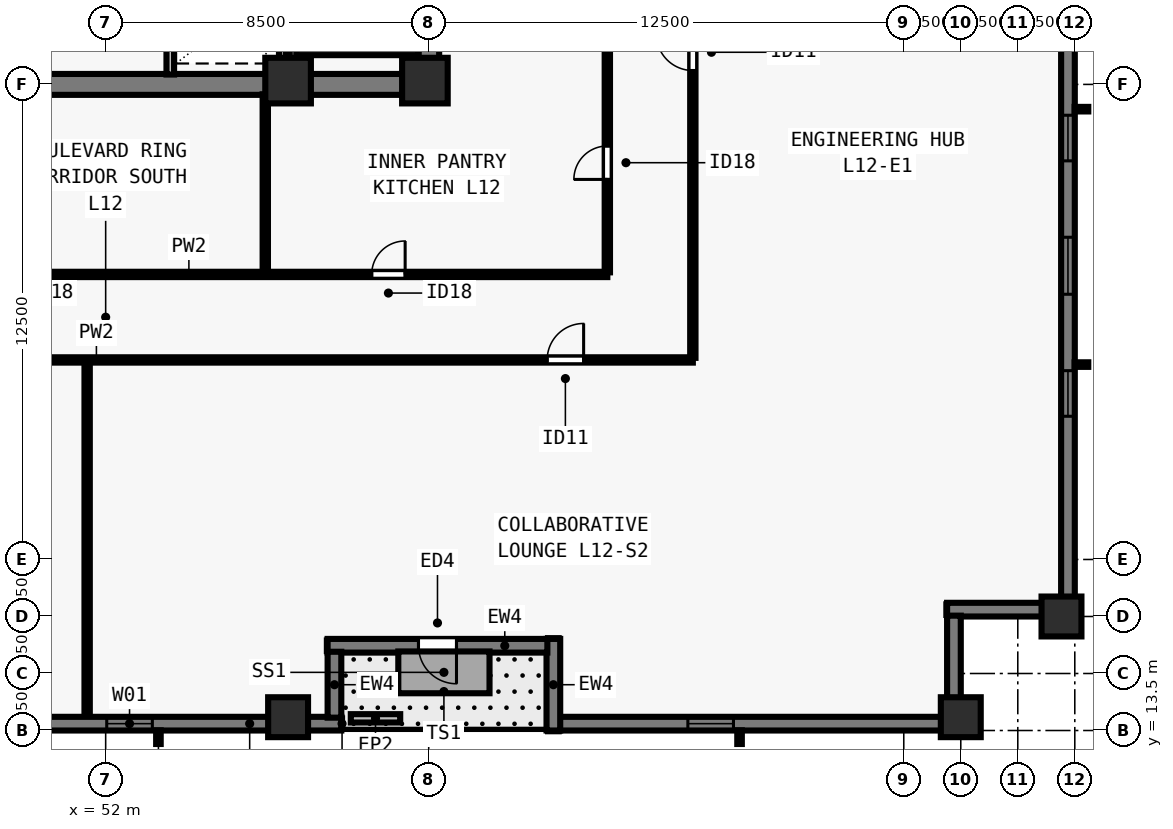
"""IFC4 building model, lengths in metres.
Left out: names, types, materials, properties, quantities, classifications, styles, units other than length and angle.
Written with IfcOpenShell. Run it as: python <this file> out.ifc"""

import sys

from ifc_helpers import new_model, si_unit, direction, frame, frame_2d, origin, origin_2d, place, context, subcontext, project, spatial, rectangle, extrude, element, fill, save


model = new_model("IFC4")
c1 = context("Model", 3, precision=1e-05, world=origin(), true_north=direction((0.0, 1.0)))
c2 = subcontext(c1, "Body", "Model", "MODEL_VIEW")
j1 = project(units=[si_unit("LENGTHUNIT", "METRE"), si_unit("PLANEANGLEUNIT", "RADIAN")], contexts=[c1])
p1 = place(None, origin())
s1 = spatial("IfcSite", under=j1, at=p1, CompositionType="ELEMENT")
p2 = place(p1, origin())
s2 = spatial("IfcBuilding", under=s1, at=p2, CompositionType="ELEMENT")
p3 = place(p2, frame((0.0, 0.0, 48.0)))
s3 = spatial("IfcBuildingStorey", under=s2, at=p3, CompositionType="ELEMENT", Elevation=48.0)
for number, where, z_axis, x_axis in (
    (1, (56.8, 30.6, 0.0), (0.0, 0.0, 1.0), (1.0, 0.0, 0.0)),
    (2, (60.4, 30.6, 0.0), (0.0, 0.0, 1.0), (1.0, 0.0, 0.0)),
):
    element("IfcColumn", number, at=place(p3, frame(where, z_axis=z_axis, x_axis=x_axis)), inside=s3, PredefinedType="COLUMN", context=c2, shape_type="SweptSolid", body=[
        extrude(rectangle(XDim=1.2, YDim=1.2, at=origin_2d()), origin(), (0.0, 0.0, 1.0), 3.5),
    ])
for number, where, z_axis, x_axis in (
    (3, (56.8, 13.85, 0.0), (0.0, 0.0, 1.0), (1.0, 0.0, 0.0)),
    (4, (74.5, 13.85, 0.0), (0.0, 0.0, 1.0), (1.0, 0.0, 0.0)),
    (5, (77.15, 16.5, 0.0), (0.0, 0.0, 1.0), (0.0, 1.0, 0.0)),
):
    element("IfcColumn", number, at=place(p3, frame(where, z_axis=z_axis, x_axis=x_axis)), inside=s3, PredefinedType="COLUMN", context=c2, shape_type="SweptSolid", body=[
        extrude(rectangle(XDim=1.05, YDim=1.05, at=origin_2d()), origin(), (0.0, 0.0, 1.0), 3.5),
    ])
p4 = place(p3, frame((58.2, 13.68, 0.0), z_axis=(0.0, 0.0, 1.0), x_axis=(-1.0, 0.0, 0.0)))
e6 = element("IfcWall", 6, at=p4, inside=s3, PredefinedType="SOLIDWALL", context=c2, shape_type="SweptSolid", body=[
    extrude(rectangle(XDim=28.362, YDim=0.36, at=frame_2d((14.181, 0.0))), origin(), (0.0, 0.0, 1.0), 3.28),
])
p5 = place(p4, frame((4.972, 0.0, 0.8)))
e7 = element("IfcOpeningElement", 7, at=p5, cuts=e6, PredefinedType="OPENING", context=c2, shape_type="SweptSolid", body=[
    extrude(rectangle(XDim=1.2, YDim=1.544, at=frame_2d((0.6, 0.772))), frame((0.0, 0.19, 0.0), z_axis=(0.0, -1.0, 0.0), x_axis=(1.0, 0.0, 0.0)), (0.0, 0.0, 1.0), 0.38),
])
p6 = place(p4, frame((8.265, 0.0, 0.8)))
e8 = element("IfcOpeningElement", 8, at=p6, cuts=e6, PredefinedType="OPENING", context=c2, shape_type="SweptSolid", body=[
    extrude(rectangle(XDim=1.5, YDim=1.544, at=frame_2d((0.75, 0.772))), frame((0.0, 0.19, 0.0), z_axis=(0.0, -1.0, 0.0), x_axis=(1.0, 0.0, 0.0)), (0.0, 0.0, 1.0), 0.38),
])
p7 = place(p4, frame((11.859, 0.0, 0.8)))
e9 = element("IfcOpeningElement", 9, at=p7, cuts=e6, PredefinedType="OPENING", context=c2, shape_type="SweptSolid", body=[
    extrude(rectangle(XDim=1.2, YDim=1.544, at=frame_2d((0.6, 0.772))), frame((0.0, 0.19, 0.0), z_axis=(0.0, -1.0, 0.0), x_axis=(1.0, 0.0, 0.0)), (0.0, 0.0, 1.0), 0.38),
])
p8 = place(p4, frame((15.153, 0.0, 0.8)))
e10 = element("IfcOpeningElement", 10, at=p8, cuts=e6, PredefinedType="OPENING", context=c2, shape_type="SweptSolid", body=[
    extrude(rectangle(XDim=1.5, YDim=1.544, at=frame_2d((0.75, 0.772))), frame((0.0, 0.19, 0.0), z_axis=(0.0, -1.0, 0.0), x_axis=(1.0, 0.0, 0.0)), (0.0, 0.0, 1.0), 0.38),
])
p9 = place(p4, frame((18.747, 0.0, 0.8)))
e11 = element("IfcOpeningElement", 11, at=p9, cuts=e6, PredefinedType="OPENING", context=c2, shape_type="SweptSolid", body=[
    extrude(rectangle(XDim=1.2, YDim=1.544, at=frame_2d((0.6, 0.772))), frame((0.0, 0.19, 0.0), z_axis=(0.0, -1.0, 0.0), x_axis=(1.0, 0.0, 0.0)), (0.0, 0.0, 1.0), 0.38),
])
p10 = place(p4, frame((22.04, 0.0, 0.8)))
e12 = element("IfcOpeningElement", 12, at=p10, cuts=e6, PredefinedType="OPENING", context=c2, shape_type="SweptSolid", body=[
    extrude(rectangle(XDim=1.5, YDim=1.544, at=frame_2d((0.75, 0.772))), frame((0.0, 0.19, 0.0), z_axis=(0.0, -1.0, 0.0), x_axis=(1.0, 0.0, 0.0)), (0.0, 0.0, 1.0), 0.38),
])
p11 = place(p3, frame((77.32, 61.5, 0.0), z_axis=(0.0, 0.0, 1.0), x_axis=(0.0, -1.0, 0.0)))
e13 = element("IfcWall", 13, at=p11, inside=s3, PredefinedType="SOLIDWALL", context=c2, shape_type="SweptSolid", body=[
    extrude(rectangle(XDim=44.662, YDim=0.36, at=frame_2d((22.331, 0.0))), origin(), (0.0, 0.0, 1.0), 3.28),
])
p12 = place(p11, frame((4.93, 0.0, 0.8)))
e14 = element("IfcOpeningElement", 14, at=p12, cuts=e13, PredefinedType="OPENING", context=c2, shape_type="SweptSolid", body=[
    extrude(rectangle(XDim=1.2, YDim=1.544, at=frame_2d((0.6, 0.772))), frame((0.0, 0.19, 0.0), z_axis=(0.0, -1.0, 0.0), x_axis=(1.0, 0.0, 0.0)), (0.0, 0.0, 1.0), 0.38),
])
p13 = place(p11, frame((8.14, 0.0, 0.8)))
e15 = element("IfcOpeningElement", 15, at=p13, cuts=e13, PredefinedType="OPENING", context=c2, shape_type="SweptSolid", body=[
    extrude(rectangle(XDim=1.5, YDim=1.544, at=frame_2d((0.75, 0.772))), frame((0.0, 0.19, 0.0), z_axis=(0.0, -1.0, 0.0), x_axis=(1.0, 0.0, 0.0)), (0.0, 0.0, 1.0), 0.38),
])
p14 = place(p11, frame((11.65, 0.0, 0.8)))
e16 = element("IfcOpeningElement", 16, at=p14, cuts=e13, PredefinedType="OPENING", context=c2, shape_type="SweptSolid", body=[
    extrude(rectangle(XDim=1.2, YDim=1.544, at=frame_2d((0.6, 0.772))), frame((0.0, 0.19, 0.0), z_axis=(0.0, -1.0, 0.0), x_axis=(1.0, 0.0, 0.0)), (0.0, 0.0, 1.0), 0.38),
])
p15 = place(p11, frame((14.861, 0.0, 0.8)))
e17 = element("IfcOpeningElement", 17, at=p15, cuts=e13, PredefinedType="OPENING", context=c2, shape_type="SweptSolid", body=[
    extrude(rectangle(XDim=1.5, YDim=1.544, at=frame_2d((0.75, 0.772))), frame((0.0, 0.19, 0.0), z_axis=(0.0, -1.0, 0.0), x_axis=(1.0, 0.0, 0.0)), (0.0, 0.0, 1.0), 0.38),
])
p16 = place(p11, frame((18.821, 0.0, 0.8)))
e18 = element("IfcOpeningElement", 18, at=p16, cuts=e13, PredefinedType="OPENING", context=c2, shape_type="SweptSolid", body=[
    extrude(rectangle(XDim=1.2, YDim=1.544, at=frame_2d((0.6, 0.772))), frame((0.0, 0.19, 0.0), z_axis=(0.0, -1.0, 0.0), x_axis=(1.0, 0.0, 0.0)), (0.0, 0.0, 1.0), 0.38),
])
p17 = place(p11, frame((20.331, 0.0, 0.8)))
e19 = element("IfcOpeningElement", 19, at=p17, cuts=e13, PredefinedType="OPENING", context=c2, shape_type="SweptSolid", body=[
    extrude(rectangle(XDim=1.5, YDim=1.544, at=frame_2d((0.75, 0.772))), frame((0.0, 0.19, 0.0), z_axis=(0.0, -1.0, 0.0), x_axis=(1.0, 0.0, 0.0)), (0.0, 0.0, 1.0), 0.38),
])
p18 = place(p11, frame((25.091, 0.0, 0.8)))
e20 = element("IfcOpeningElement", 20, at=p18, cuts=e13, PredefinedType="OPENING", context=c2, shape_type="SweptSolid", body=[
    extrude(rectangle(XDim=1.2, YDim=1.544, at=frame_2d((0.6, 0.772))), frame((0.0, 0.19, 0.0), z_axis=(0.0, -1.0, 0.0), x_axis=(1.0, 0.0, 0.0)), (0.0, 0.0, 1.0), 0.38),
])
p19 = place(p11, frame((28.302, 0.0, 0.8)))
e21 = element("IfcOpeningElement", 21, at=p19, cuts=e13, PredefinedType="OPENING", context=c2, shape_type="SweptSolid", body=[
    extrude(rectangle(XDim=1.5, YDim=1.544, at=frame_2d((0.75, 0.772))), frame((0.0, 0.19, 0.0), z_axis=(0.0, -1.0, 0.0), x_axis=(1.0, 0.0, 0.0)), (0.0, 0.0, 1.0), 0.38),
])
p20 = place(p11, frame((31.812, 0.0, 0.8)))
e22 = element("IfcOpeningElement", 22, at=p20, cuts=e13, PredefinedType="OPENING", context=c2, shape_type="SweptSolid", body=[
    extrude(rectangle(XDim=1.2, YDim=1.544, at=frame_2d((0.6, 0.772))), frame((0.0, 0.19, 0.0), z_axis=(0.0, -1.0, 0.0), x_axis=(1.0, 0.0, 0.0)), (0.0, 0.0, 1.0), 0.38),
])
p21 = place(p11, frame((35.022, 0.0, 0.8)))
e23 = element("IfcOpeningElement", 23, at=p21, cuts=e13, PredefinedType="OPENING", context=c2, shape_type="SweptSolid", body=[
    extrude(rectangle(XDim=1.5, YDim=1.544, at=frame_2d((0.75, 0.772))), frame((0.0, 0.19, 0.0), z_axis=(0.0, -1.0, 0.0), x_axis=(1.0, 0.0, 0.0)), (0.0, 0.0, 1.0), 0.38),
])
p22 = place(p11, frame((38.532, 0.0, 0.8)))
e24 = element("IfcOpeningElement", 24, at=p22, cuts=e13, PredefinedType="OPENING", context=c2, shape_type="SweptSolid", body=[
    extrude(rectangle(XDim=1.2, YDim=1.544, at=frame_2d((0.6, 0.772))), frame((0.0, 0.19, 0.0), z_axis=(0.0, -1.0, 0.0), x_axis=(1.0, 0.0, 0.0)), (0.0, 0.0, 1.0), 0.38),
])
p23 = place(p3, frame((77.5, 16.68, 0.0), z_axis=(0.0, 0.0, 1.0), x_axis=(-1.0, 0.0, 0.0)))
e25 = element("IfcWall", 25, at=p23, inside=s3, PredefinedType="SOLIDWALL", context=c2, shape_type="SweptSolid", body=[
    extrude(rectangle(XDim=3.36, YDim=0.36, at=frame_2d((1.68, 0.0))), origin(), (0.0, 0.0, 1.0), 3.28),
])
p24 = place(p3, frame((74.32, 16.522, 0.0), z_axis=(0.0, 0.0, 1.0), x_axis=(0.0, -1.0, 0.0)))
e26 = element("IfcWall", 26, at=p24, inside=s3, PredefinedType="SOLIDWALL", context=c2, shape_type="SweptSolid", body=[
    extrude(rectangle(XDim=2.684, YDim=0.36, at=frame_2d((1.342, 0.0))), origin(), (0.0, 0.0, 1.0), 3.28),
])
p25 = place(p3, frame((74.5, 13.68, 0.0), z_axis=(0.0, 0.0, 1.0), x_axis=(-1.0, 0.0, 0.0)))
e27 = element("IfcWall", 27, at=p25, inside=s3, PredefinedType="SOLIDWALL", context=c2, shape_type="SweptSolid", body=[
    extrude(rectangle(XDim=10.562, YDim=0.36, at=frame_2d((5.281, 0.0))), origin(), (0.0, 0.0, 1.0), 3.28),
])
p26 = place(p25, frame((5.981, 0.0, 0.8)))
e28 = element("IfcOpeningElement", 28, at=p26, cuts=e27, PredefinedType="OPENING", context=c2, shape_type="SweptSolid", body=[
    extrude(rectangle(XDim=1.2, YDim=1.544, at=frame_2d((0.6, 0.772))), frame((0.0, 0.19, 0.0), z_axis=(0.0, -1.0, 0.0), x_axis=(1.0, 0.0, 0.0)), (0.0, 0.0, 1.0), 0.38),
])
p27 = place(p3, frame((63.78, 13.5, 0.0), z_axis=(0.0, 0.0, 1.0), x_axis=(0.0, 1.0, 0.0)))
e29 = element("IfcWall", 29, at=p27, inside=s3, PredefinedType="SOLIDWALL", context=c2, shape_type="SweptSolid", body=[
    extrude(rectangle(XDim=2.41, YDim=0.36, at=frame_2d((1.205, 0.0))), origin(), (0.0, 0.0, 1.0), 3.28),
])
p28 = place(p3, frame((63.622, 15.73, 0.0), z_axis=(0.0, 0.0, 1.0), x_axis=(-1.0, 0.0, 0.0)))
e30 = element("IfcWall", 30, at=p28, inside=s3, PredefinedType="SOLIDWALL", context=c2, shape_type="SweptSolid", body=[
    extrude(rectangle(XDim=5.782, YDim=0.36, at=frame_2d((2.891, 0.0))), origin(), (0.0, 0.0, 1.0), 3.28),
])
p29 = place(p28, frame((2.391, 0.0, 0.0)))
e31 = element("IfcOpeningElement", 31, at=p29, cuts=e30, PredefinedType="OPENING", context=c2, shape_type="SweptSolid", body=[
    extrude(rectangle(XDim=1.0, YDim=2.15, at=frame_2d((0.5, 1.075))), frame((0.0, 0.19, 0.0), z_axis=(0.0, -1.0, 0.0), x_axis=(1.0, 0.0, 0.0)), (0.0, 0.0, 1.0), 0.38),
])
p30 = place(p3, frame((58.02, 15.572, 0.0), z_axis=(0.0, 0.0, 1.0), x_axis=(0.0, -1.0, 0.0)))
e32 = element("IfcWall", 32, at=p30, inside=s3, PredefinedType="SOLIDWALL", context=c2, shape_type="SweptSolid", body=[
    extrude(rectangle(XDim=1.734, YDim=0.36, at=frame_2d((0.867, 0.0))), origin(), (0.0, 0.0, 1.0), 3.28),
])
p31 = place(p3, frame((58.45, 13.82, 0.0), z_axis=(0.0, 0.0, 1.0), x_axis=(1.0, 0.0, 0.0)))
e33 = element("IfcWall", 33, at=p31, inside=s3, PredefinedType="PARAPET", context=c2, shape_type="SweptSolid", body=[
    extrude(rectangle(XDim=1.3, YDim=0.22, at=frame_2d((0.65, 0.0))), origin(), (0.0, 0.0, 1.0), 0.55),
])
p32 = place(p3, frame((43.225, 30.5, 0.0), z_axis=(0.0, 0.0, 1.0), x_axis=(1.0, 0.0, 0.0)))
e34 = element("IfcWall", 34, at=p32, inside=s3, PredefinedType="SHEAR", context=c2, shape_type="SweptSolid", body=[
    extrude(rectangle(XDim=17.55, YDim=0.55, at=frame_2d((8.775, 0.0))), origin(), (0.0, 0.0, 1.0), 3.28),
])
p33 = place(p3, frame((60.5, 30.765, 0.0), z_axis=(0.0, 0.0, 1.0), x_axis=(0.0, 1.0, 0.0)))
e35 = element("IfcWall", 35, at=p33, inside=s3, PredefinedType="SHEAR", context=c2, shape_type="SweptSolid", body=[
    extrude(rectangle(XDim=7.985, YDim=0.55, at=frame_2d((3.993, 0.0))), origin(), (0.0, 0.0, 1.0), 3.28),
])
p34 = place(p3, frame((53.7, 30.76, 0.0), z_axis=(0.0, 0.0, 1.0), x_axis=(0.0, 1.0, 0.0)))
e36 = element("IfcWall", 36, at=p34, inside=s3, PredefinedType="SOLIDWALL", context=c2, shape_type="SweptSolid", body=[
    extrude(rectangle(XDim=7.855, YDim=0.2, at=frame_2d((3.927, 0.0))), origin(), (0.0, 0.0, 1.0), 3.28),
])
p35 = place(p3, frame((56.65, 30.76, 0.0), z_axis=(0.0, 0.0, 1.0), x_axis=(0.0, 1.0, 0.0)))
e37 = element("IfcWall", 37, at=p35, inside=s3, PredefinedType="SOLIDWALL", context=c2, shape_type="SweptSolid", body=[
    extrude(rectangle(XDim=7.855, YDim=0.18, at=frame_2d((3.927, 0.0))), origin(), (0.0, 0.0, 1.0), 3.28),
])
p36 = place(p3, frame((36.55, 23.25, 0.0), z_axis=(0.0, 0.0, 1.0), x_axis=(1.0, 0.0, 0.0)))
e38 = element("IfcWall", 38, at=p36, inside=s3, PredefinedType="PARTITIONING", context=c2, shape_type="SweptSolid", body=[
    extrude(rectangle(XDim=30.9, YDim=0.14, at=frame_2d((15.45, 0.0))), origin(), (0.0, 0.0, 1.0), 3.28),
])
p37 = place(p36, frame((2.386, 0.0, 0.0)))
e39 = element("IfcOpeningElement", 39, at=p37, cuts=e38, PredefinedType="OPENING", context=c2, shape_type="SweptSolid", body=[
    extrude(rectangle(XDim=0.96, YDim=2.12, at=frame_2d((0.48, 1.06))), frame((0.0, 0.08, 0.0), z_axis=(0.0, -1.0, 0.0), x_axis=(1.0, 0.0, 0.0)), (0.0, 0.0, 1.0), 0.16),
])
p38 = place(p36, frame((27.066, 0.0, 0.0)))
e40 = element("IfcOpeningElement", 40, at=p38, cuts=e38, PredefinedType="OPENING", context=c2, shape_type="SweptSolid", body=[
    extrude(rectangle(XDim=0.96, YDim=2.12, at=frame_2d((0.48, 1.06))), frame((0.0, 0.08, 0.0), z_axis=(0.0, -1.0, 0.0), x_axis=(1.0, 0.0, 0.0)), (0.0, 0.0, 1.0), 0.16),
])
p39 = place(p3, frame((67.45, 23.305, 0.0), z_axis=(0.0, 0.0, 1.0), x_axis=(0.0, 1.0, 0.0)))
e41 = element("IfcWall", 41, at=p39, inside=s3, PredefinedType="PARTITIONING", context=c2, shape_type="SweptSolid", body=[
    extrude(rectangle(XDim=31.39, YDim=0.14, at=frame_2d((15.695, 0.0))), origin(), (0.0, 0.0, 1.0), 3.28),
])
p40 = place(p39, frame((7.561, 0.0, 0.0)))
e42 = element("IfcOpeningElement", 42, at=p40, cuts=e41, PredefinedType="OPENING", context=c2, shape_type="SweptSolid", body=[
    extrude(rectangle(XDim=0.96, YDim=2.12, at=frame_2d((0.48, 1.06))), frame((0.0, 0.08, 0.0), z_axis=(0.0, -1.0, 0.0), x_axis=(1.0, 0.0, 0.0)), (0.0, 0.0, 1.0), 0.16),
])
p41 = place(p39, frame((23.211, 0.0, 0.0)))
e43 = element("IfcOpeningElement", 43, at=p41, cuts=e41, PredefinedType="OPENING", context=c2, shape_type="SweptSolid", body=[
    extrude(rectangle(XDim=0.96, YDim=2.12, at=frame_2d((0.48, 1.06))), frame((0.0, 0.08, 0.0), z_axis=(0.0, -1.0, 0.0), x_axis=(1.0, 0.0, 0.0)), (0.0, 0.0, 1.0), 0.16),
])
p42 = place(p3, frame((38.8, 25.5, 0.0), z_axis=(0.0, 0.0, 1.0), x_axis=(1.0, 0.0, 0.0)))
e44 = element("IfcWall", 44, at=p42, inside=s3, PredefinedType="PARTITIONING", context=c2, shape_type="SweptSolid", body=[
    extrude(rectangle(XDim=26.4, YDim=0.14, at=frame_2d((13.2, 0.0))), origin(), (0.0, 0.0, 1.0), 3.28),
])
p43 = place(p42, frame((1.2, 0.0, 0.0)))
e45 = element("IfcOpeningElement", 45, at=p43, cuts=e44, PredefinedType="OPENING", context=c2, shape_type="SweptSolid", body=[
    extrude(rectangle(XDim=0.88, YDim=2.1, at=frame_2d((0.44, 1.05))), frame((0.0, 0.08, 0.0), z_axis=(0.0, -1.0, 0.0), x_axis=(1.0, 0.0, 0.0)), (0.0, 0.0, 1.0), 0.16),
])
p44 = place(p42, frame((9.7, 0.0, 0.0)))
e46 = element("IfcOpeningElement", 46, at=p44, cuts=e44, PredefinedType="OPENING", context=c2, shape_type="SweptSolid", body=[
    extrude(rectangle(XDim=0.88, YDim=2.1, at=frame_2d((0.44, 1.05))), frame((0.0, 0.08, 0.0), z_axis=(0.0, -1.0, 0.0), x_axis=(1.0, 0.0, 0.0)), (0.0, 0.0, 1.0), 0.16),
])
p45 = place(p42, frame((20.2, 0.0, 0.0)))
e47 = element("IfcOpeningElement", 47, at=p45, cuts=e44, PredefinedType="OPENING", context=c2, shape_type="SweptSolid", body=[
    extrude(rectangle(XDim=0.88, YDim=2.1, at=frame_2d((0.44, 1.05))), frame((0.0, 0.08, 0.0), z_axis=(0.0, -1.0, 0.0), x_axis=(1.0, 0.0, 0.0)), (0.0, 0.0, 1.0), 0.16),
])
p46 = place(p3, frame((65.2, 25.555, 0.0), z_axis=(0.0, 0.0, 1.0), x_axis=(0.0, 1.0, 0.0)))
e48 = element("IfcWall", 48, at=p46, inside=s3, PredefinedType="PARTITIONING", context=c2, shape_type="SweptSolid", body=[
    extrude(rectangle(XDim=13.195, YDim=0.14, at=frame_2d((6.598, 0.0))), origin(), (0.0, 0.0, 1.0), 3.28),
])
p47 = place(p46, frame((2.445, 0.0, 0.0)))
e49 = element("IfcOpeningElement", 49, at=p47, cuts=e48, PredefinedType="OPENING", context=c2, shape_type="SweptSolid", body=[
    extrude(rectangle(XDim=0.88, YDim=2.1, at=frame_2d((0.44, 1.05))), frame((0.0, 0.08, 0.0), z_axis=(0.0, -1.0, 0.0), x_axis=(1.0, 0.0, 0.0)), (0.0, 0.0, 1.0), 0.16),
])
p48 = place(p3, frame((56.2, 25.555, 0.0), z_axis=(0.0, 0.0, 1.0), x_axis=(0.0, 1.0, 0.0)))
e50 = element("IfcWall", 50, at=p48, inside=s3, PredefinedType="PARTITIONING", context=c2, shape_type="SweptSolid", body=[
    extrude(rectangle(XDim=4.685, YDim=0.14, at=frame_2d((2.343, 0.0))), origin(), (0.0, 0.0, 1.0), 2.849),
])
p49 = place(p3, frame((51.512, 13.92, 0.0), z_axis=(0.0, 0.0, 1.0), x_axis=(0.0, 1.0, 0.0)))
e51 = element("IfcWall", 51, at=p49, inside=s3, PredefinedType="PARTITIONING", context=c2, shape_type="SweptSolid", body=[
    extrude(rectangle(XDim=9.23, YDim=0.14, at=frame_2d((4.615, 0.0))), origin(), (0.0, 0.0, 1.0), 2.849),
])
p50 = place(p3, frame((57.005, 31.36, 0.0), z_axis=(0.0, 0.0, 1.0), x_axis=(1.0, 0.0, 0.0)))
e52 = element("IfcWall", 52, at=p50, inside=s3, PredefinedType="SOLIDWALL", context=c2, shape_type="SweptSolid", body=[
    extrude(rectangle(XDim=3.23, YDim=0.18, at=frame_2d((1.615, 0.0))), origin(), (0.0, 0.0, 1.0), 3.28),
])
p51 = place(p3, frame((56.93, 38.78, 0.0), z_axis=(0.0, 0.0, 1.0), x_axis=(0.0, -1.0, 0.0)))
e53 = element("IfcWall", 53, at=p51, inside=s3, PredefinedType="SOLIDWALL", context=c2, shape_type="SweptSolid", body=[
    extrude(rectangle(XDim=8.017, YDim=0.18, at=frame_2d((4.009, 0.0))), origin(), (0.0, 0.0, 1.0), 3.28),
])
p52 = place(p5, origin())
e54 = element("IfcWindow", 54, at=p52, inside=s3, PartitioningType="SINGLE_PANEL", PredefinedType="WINDOW", context=c2, shape_type="SweptSolid", body=[
    extrude(rectangle(XDim=1.2, YDim=1.544, at=frame_2d((0.6, 0.772))), frame((0.0, -0.05, 0.0), z_axis=(0.0, -1.0, 0.0), x_axis=(1.0, 0.0, 0.0)), (0.0, 0.0, 1.0), 0.06),
])
fill(e7, e54)
p53 = place(p20, origin())
e55 = element("IfcWindow", 55, at=p53, inside=s3, PartitioningType="SINGLE_PANEL", PredefinedType="WINDOW", context=c2, shape_type="SweptSolid", body=[
    extrude(rectangle(XDim=1.2, YDim=1.544, at=frame_2d((0.6, 0.772))), frame((0.0, -0.05, 0.0), z_axis=(0.0, -1.0, 0.0), x_axis=(1.0, 0.0, 0.0)), (0.0, 0.0, 1.0), 0.06),
])
fill(e22, e55)
p54 = place(p21, origin())
e56 = element("IfcWindow", 56, at=p54, inside=s3, PartitioningType="SINGLE_PANEL", PredefinedType="WINDOW", context=c2, shape_type="SweptSolid", body=[
    extrude(rectangle(XDim=1.5, YDim=1.544, at=frame_2d((0.75, 0.772))), frame((0.0, -0.05, 0.0), z_axis=(0.0, -1.0, 0.0), x_axis=(1.0, 0.0, 0.0)), (0.0, 0.0, 1.0), 0.06),
])
fill(e23, e56)
p55 = place(p22, origin())
e57 = element("IfcWindow", 57, at=p55, inside=s3, PartitioningType="SINGLE_PANEL", PredefinedType="WINDOW", context=c2, shape_type="SweptSolid", body=[
    extrude(rectangle(XDim=1.2, YDim=1.544, at=frame_2d((0.6, 0.772))), frame((0.0, -0.05, 0.0), z_axis=(0.0, -1.0, 0.0), x_axis=(1.0, 0.0, 0.0)), (0.0, 0.0, 1.0), 0.06),
])
fill(e24, e57)
p56 = place(p26, origin())
e58 = element("IfcWindow", 58, at=p56, inside=s3, PartitioningType="SINGLE_PANEL", PredefinedType="WINDOW", context=c2, shape_type="SweptSolid", body=[
    extrude(rectangle(XDim=1.2, YDim=1.544, at=frame_2d((0.6, 0.772))), frame((0.0, -0.05, 0.0), z_axis=(0.0, -1.0, 0.0), x_axis=(1.0, 0.0, 0.0)), (0.0, 0.0, 1.0), 0.06),
])
fill(e28, e58)
p57 = place(p29, origin())
e59 = element("IfcDoor", 59, at=p57, inside=s3, OperationType="SINGLE_SWING_LEFT", PredefinedType="DOOR", context=c2, shape_type="SweptSolid", body=[
    extrude(rectangle(XDim=1.0, YDim=2.15, at=frame_2d((0.5, 1.075))), frame((0.0, 0.025, 0.0), z_axis=(0.0, -1.0, 0.0), x_axis=(1.0, 0.0, 0.0)), (0.0, 0.0, 1.0), 0.05),
])
fill(e31, e59)
p58 = place(p45, origin())
e60 = element("IfcDoor", 60, at=p58, inside=s3, OperationType="SINGLE_SWING_RIGHT", PredefinedType="DOOR", context=c2, shape_type="SweptSolid", body=[
    extrude(rectangle(XDim=0.88, YDim=2.1, at=frame_2d((0.44, 1.05))), frame((0.0, 0.025, 0.0), z_axis=(0.0, -1.0, 0.0), x_axis=(1.0, 0.0, 0.0)), (0.0, 0.0, 1.0), 0.05),
])
fill(e47, e60)
p59 = place(p47, origin())
e61 = element("IfcDoor", 61, at=p59, inside=s3, OperationType="SINGLE_SWING_LEFT", PredefinedType="DOOR", context=c2, shape_type="SweptSolid", body=[
    extrude(rectangle(XDim=0.88, YDim=2.1, at=frame_2d((0.44, 1.05))), frame((0.0, 0.025, 0.0), z_axis=(0.0, -1.0, 0.0), x_axis=(1.0, 0.0, 0.0)), (0.0, 0.0, 1.0), 0.05),
])
fill(e49, e61)
p60 = place(p38, origin())
e62 = element("IfcDoor", 62, at=p60, inside=s3, OperationType="SINGLE_SWING_RIGHT", PredefinedType="DOOR", context=c2, shape_type="SweptSolid", body=[
    extrude(rectangle(XDim=0.96, YDim=2.12, at=frame_2d((0.48, 1.06))), frame((0.0, 0.025, 0.0), z_axis=(0.0, -1.0, 0.0), x_axis=(1.0, 0.0, 0.0)), (0.0, 0.0, 1.0), 0.05),
])
fill(e40, e62)
p61 = place(p40, origin())
e63 = element("IfcDoor", 63, at=p61, inside=s3, OperationType="SINGLE_SWING_RIGHT", PredefinedType="DOOR", context=c2, shape_type="SweptSolid", body=[
    extrude(rectangle(XDim=0.96, YDim=2.12, at=frame_2d((0.48, 1.06))), frame((0.0, 0.025, 0.0), z_axis=(0.0, -1.0, 0.0), x_axis=(1.0, 0.0, 0.0)), (0.0, 0.0, 1.0), 0.05),
])
fill(e42, e63)
save(model, sys.argv[1])
